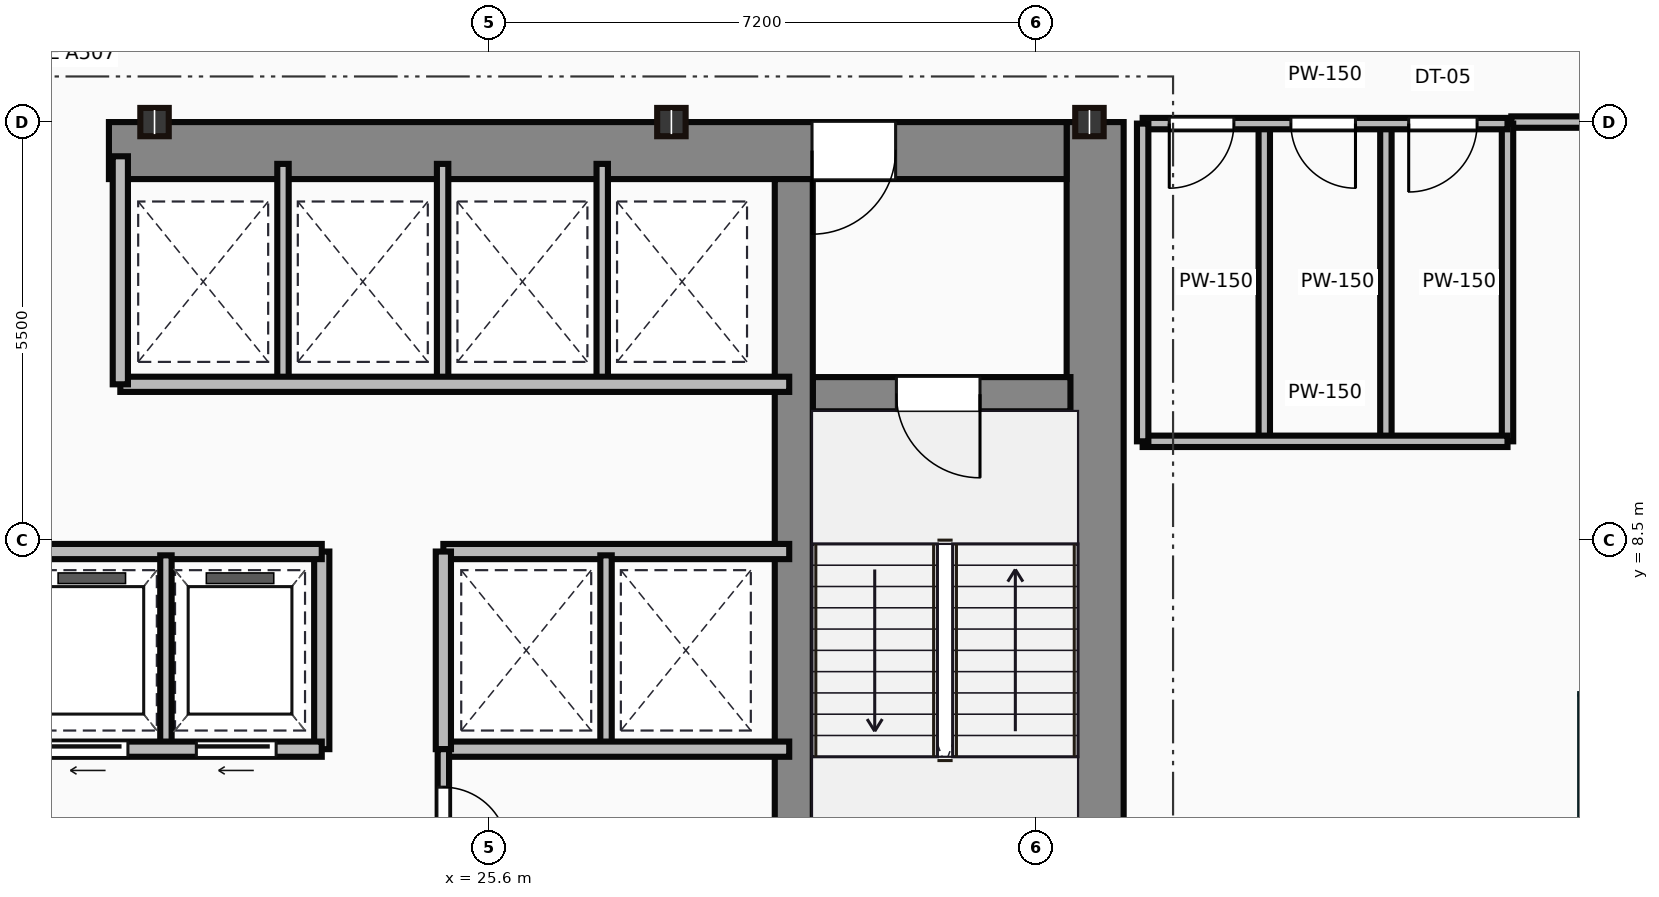
"""IFC4 building model, lengths in metres.
Left out: names, types, materials, properties, quantities, classifications, styles, units other than length and angle.
Written with IfcOpenShell. Run it as: python <this file> out.ifc"""

import sys

from ifc_helpers import new_model, si_unit, direction, frame, frame_2d, origin, origin_2d, place, context, subcontext, project, spatial, rectangle, i_section, extrude, source, transform, mapped, element, fill, save


model = new_model("IFC4")
c1 = context("Model", 3, precision=1e-05, world=origin(), true_north=direction((0.0, 1.0)))
c2 = subcontext(c1, "Body", "Model", "MODEL_VIEW")
j1 = project(units=[si_unit("LENGTHUNIT", "METRE"), si_unit("PLANEANGLEUNIT", "RADIAN")], contexts=[c1])
p1 = place(None, origin())
s1 = spatial("IfcSite", under=j1, at=p1, CompositionType="ELEMENT")
p2 = place(p1, origin())
s2 = spatial("IfcBuilding", under=s1, at=p2, CompositionType="ELEMENT")
p3 = place(p2, frame((0.0, 0.0, 151.55)))
s3 = spatial("IfcBuildingStorey", under=s2, at=p3, CompositionType="ELEMENT", Elevation=151.55)
m1 = source(origin(), c2, "Body", "SweptSolid", [
    extrude(rectangle(XDim=13.1, YDim=0.75, at=frame_2d((6.55, 0.0))), origin(), (0.0, 0.0, 1.0), 3.65),
])
p4 = place(p3, frame((33.575, 0.9, 0.0), z_axis=(0.0, 0.0, 1.0), x_axis=(0.0, 1.0, 0.0)))
e1 = element("IfcWall", 1, at=p4, inside=s3, PredefinedType="SHEAR", context=c2, shape_type="MappedRepresentation", body=[
    mapped(m1, transform((0.0, 0.0, 0.0))),
])
m2 = source(origin(), c2, "Body", "SweptSolid", [
    extrude(rectangle(XDim=12.6, YDim=0.75, at=frame_2d((6.3, 0.0))), origin(), (0.0, 0.0, 1.0), 3.65),
])
p5 = place(p3, frame((20.6, 13.625, 0.0), z_axis=(0.0, 0.0, 1.0), x_axis=(1.0, 0.0, 0.0)))
e2 = element("IfcWall", 2, at=p5, inside=s3, PredefinedType="SHEAR", context=c2, shape_type="MappedRepresentation", body=[
    mapped(m2, transform((0.0, 0.0, 0.0))),
])
p6 = place(p5, frame((9.25, 0.0, 0.0)))
e3 = element("IfcOpeningElement", 3, at=p6, cuts=e2, PredefinedType="OPENING", context=c2, shape_type="SweptSolid", body=[
    extrude(rectangle(XDim=1.1, YDim=2.15, at=frame_2d((0.55, 1.075))), frame((0.0, 0.385, 0.0), z_axis=(0.0, -1.0, 0.0), x_axis=(1.0, 0.0, 0.0)), (0.0, 0.0, 1.0), 0.77),
])
m3 = source(origin(), c2, "Body", "SweptSolid", [
    extrude(rectangle(XDim=12.35, YDim=0.5, at=frame_2d((6.175, 0.0))), origin(), (0.0, 0.0, 1.0), 3.65),
])
p7 = place(p3, frame((29.61, 0.9, 0.0), z_axis=(0.0, 0.0, 1.0), x_axis=(0.0, 1.0, 0.0)))
e4 = element("IfcWall", 4, at=p7, inside=s3, PredefinedType="SHEAR", context=c2, shape_type="MappedRepresentation", body=[
    mapped(m3, transform((0.0, 0.0, 0.0))),
])
m4 = source(origin(), c2, "Body", "SweptSolid", [
    extrude(rectangle(XDim=3.39, YDim=0.45, at=frame_2d((1.695, 0.0))), origin(), (0.0, 0.0, 1.0), 3.65),
])
p8 = place(p3, frame((29.86, 10.42, 0.0), z_axis=(0.0, 0.0, 1.0), x_axis=(1.0, 0.0, 0.0)))
e5 = element("IfcWall", 5, at=p8, inside=s3, PredefinedType="SHEAR", context=c2, shape_type="MappedRepresentation", body=[
    mapped(m4, transform((0.0, 0.0, 0.0))),
])
p9 = place(p8, frame((1.1, 0.0, 0.0)))
e6 = element("IfcOpeningElement", 6, at=p9, cuts=e5, PredefinedType="OPENING", context=c2, shape_type="SweptSolid", body=[
    extrude(rectangle(XDim=1.1, YDim=2.15, at=frame_2d((0.55, 1.075))), frame((0.0, 0.235, 0.0), z_axis=(0.0, -1.0, 0.0), x_axis=(1.0, 0.0, 0.0)), (0.0, 0.0, 1.0), 0.47),
])
m5 = source(origin(), c2, "Body", "SweptSolid", [
    extrude(i_section(OverallWidth=0.374, OverallDepth=0.372, WebThickness=0.016, FlangeThickness=0.026, at=origin_2d()), origin(), (0.0, 0.0, 1.0), 3.65),
])
for number, where, z_axis, x_axis in (
    (7, (21.2, 14.0, 0.0), (0.0, 0.0, 1.0), (1.0, 0.0, 0.0)),
    (8, (28.0, 14.0, 0.0), (0.0, 0.0, 1.0), (1.0, 0.0, 0.0)),
    (9, (33.5, 14.0, 0.0), (0.0, 0.0, 1.0), (1.0, 0.0, 0.0)),
):
    element("IfcColumn", number, at=place(p3, frame(where, z_axis=z_axis, x_axis=x_axis)), inside=s3, PredefinedType="COLUMN", context=c2, shape_type="MappedRepresentation", body=[
        mapped(m5, transform((0.0, 0.0, 0.0))),
    ])
m6 = source(origin(), c2, "Body", "SweptSolid", [
    extrude(rectangle(XDim=11.85, YDim=0.2, at=frame_2d((5.925, 0.0))), origin(), (0.0, 0.0, 1.0), 3.4),
])
p10 = place(p3, frame((11.55, 5.75, 0.0), z_axis=(0.0, 0.0, 1.0), x_axis=(1.0, 0.0, 0.0)))
e10 = element("IfcWall", 10, at=p10, inside=s3, PredefinedType="PARTITIONING", context=c2, shape_type="MappedRepresentation", body=[
    mapped(m6, transform((0.0, 0.0, 0.0))),
])
p11 = place(p10, frame((0.45, 0.0, 0.0)))
e11 = element("IfcOpeningElement", 11, at=p11, cuts=e10, PredefinedType="OPENING", context=c2, shape_type="SweptSolid", body=[
    extrude(rectangle(XDim=1.05, YDim=2.15, at=frame_2d((0.525, 1.075))), frame((0.0, 0.11, 0.0), z_axis=(0.0, -1.0, 0.0), x_axis=(1.0, 0.0, 0.0)), (0.0, 0.0, 1.0), 0.22),
])
p12 = place(p10, frame((2.4, 0.0, 0.0)))
e12 = element("IfcOpeningElement", 12, at=p12, cuts=e10, PredefinedType="OPENING", context=c2, shape_type="SweptSolid", body=[
    extrude(rectangle(XDim=1.05, YDim=2.15, at=frame_2d((0.525, 1.075))), frame((0.0, 0.11, 0.0), z_axis=(0.0, -1.0, 0.0), x_axis=(1.0, 0.0, 0.0)), (0.0, 0.0, 1.0), 0.22),
])
p13 = place(p10, frame((4.35, 0.0, 0.0)))
e13 = element("IfcOpeningElement", 13, at=p13, cuts=e10, PredefinedType="OPENING", context=c2, shape_type="SweptSolid", body=[
    extrude(rectangle(XDim=1.05, YDim=2.15, at=frame_2d((0.525, 1.075))), frame((0.0, 0.11, 0.0), z_axis=(0.0, -1.0, 0.0), x_axis=(1.0, 0.0, 0.0)), (0.0, 0.0, 1.0), 0.22),
])
p14 = place(p10, frame((6.3, 0.0, 0.0)))
e14 = element("IfcOpeningElement", 14, at=p14, cuts=e10, PredefinedType="OPENING", context=c2, shape_type="SweptSolid", body=[
    extrude(rectangle(XDim=1.05, YDim=2.15, at=frame_2d((0.525, 1.075))), frame((0.0, 0.11, 0.0), z_axis=(0.0, -1.0, 0.0), x_axis=(1.0, 0.0, 0.0)), (0.0, 0.0, 1.0), 0.22),
])
p15 = place(p10, frame((8.25, 0.0, 0.0)))
e15 = element("IfcOpeningElement", 15, at=p15, cuts=e10, PredefinedType="OPENING", context=c2, shape_type="SweptSolid", body=[
    extrude(rectangle(XDim=1.05, YDim=2.15, at=frame_2d((0.525, 1.075))), frame((0.0, 0.11, 0.0), z_axis=(0.0, -1.0, 0.0), x_axis=(1.0, 0.0, 0.0)), (0.0, 0.0, 1.0), 0.22),
])
p16 = place(p10, frame((10.2, 0.0, 0.0)))
e16 = element("IfcOpeningElement", 16, at=p16, cuts=e10, PredefinedType="OPENING", context=c2, shape_type="SweptSolid", body=[
    extrude(rectangle(XDim=1.05, YDim=2.15, at=frame_2d((0.525, 1.075))), frame((0.0, 0.11, 0.0), z_axis=(0.0, -1.0, 0.0), x_axis=(1.0, 0.0, 0.0)), (0.0, 0.0, 1.0), 0.22),
])
p17 = place(p3, frame((11.55, 8.35, 0.0), z_axis=(0.0, 0.0, 1.0), x_axis=(1.0, 0.0, 0.0)))
e17 = element("IfcWall", 17, at=p17, inside=s3, PredefinedType="PARTITIONING", context=c2, shape_type="MappedRepresentation", body=[
    mapped(m6, transform((0.0, 0.0, 0.0))),
])
m7 = source(origin(), c2, "Body", "SweptSolid", [
    extrude(rectangle(XDim=2.6, YDim=0.2, at=frame_2d((1.3, 0.0))), origin(), (0.0, 0.0, 1.0), 3.4),
])
p18 = place(p3, frame((23.4, 5.75, 0.0), z_axis=(0.0, 0.0, 1.0), x_axis=(0.0, 1.0, 0.0)))
e18 = element("IfcWall", 18, at=p18, inside=s3, PredefinedType="PARTITIONING", context=c2, shape_type="MappedRepresentation", body=[
    mapped(m7, transform((0.0, 0.0, 0.0))),
])
m8 = source(origin(), c2, "Body", "SweptSolid", [
    extrude(rectangle(XDim=2.5, YDim=0.15, at=frame_2d((1.25, 0.0))), origin(), (0.0, 0.0, 1.0), 3.4),
])
p19 = place(p3, frame((21.35, 5.8, 0.0), z_axis=(0.0, 0.0, 1.0), x_axis=(0.0, 1.0, 0.0)))
e19 = element("IfcWall", 19, at=p19, inside=s3, PredefinedType="PARTITIONING", context=c2, shape_type="MappedRepresentation", body=[
    mapped(m8, transform((0.0, 0.0, 0.0))),
])
m9 = source(origin(), c2, "Body", "SweptSolid", [
    extrude(rectangle(XDim=8.8, YDim=0.2, at=frame_2d((4.4, 0.0))), origin(), (0.0, 0.0, 1.0), 3.4),
])
p20 = place(p3, frame((20.75, 10.55, 0.0), z_axis=(0.0, 0.0, 1.0), x_axis=(1.0, 0.0, 0.0)))
e20 = element("IfcWall", 20, at=p20, inside=s3, PredefinedType="PARTITIONING", context=c2, shape_type="MappedRepresentation", body=[
    mapped(m9, transform((0.0, 0.0, 0.0))),
])
m10 = source(origin(), c2, "Body", "SweptSolid", [
    extrude(rectangle(XDim=3.0, YDim=0.2, at=frame_2d((1.5, 0.0))), origin(), (0.0, 0.0, 1.0), 3.4),
])
p21 = place(p3, frame((20.75, 10.55, 0.0), z_axis=(0.0, 0.0, 1.0), x_axis=(0.0, 1.0, 0.0)))
e21 = element("IfcWall", 21, at=p21, inside=s3, PredefinedType="PARTITIONING", context=c2, shape_type="MappedRepresentation", body=[
    mapped(m10, transform((0.0, 0.0, 0.0))),
])
m11 = source(origin(), c2, "Body", "SweptSolid", [
    extrude(rectangle(XDim=2.85, YDim=0.15, at=frame_2d((1.425, 0.0))), origin(), (0.0, 0.0, 1.0), 3.4),
])
for number, where, z_axis, x_axis in (
    (22, (22.89, 10.6, 0.0), (0.0, 0.0, 1.0), (0.0, 1.0, 0.0)),
    (23, (24.99, 10.6, 0.0), (0.0, 0.0, 1.0), (0.0, 1.0, 0.0)),
    (24, (27.09, 10.6, 0.0), (0.0, 0.0, 1.0), (0.0, 1.0, 0.0)),
):
    element("IfcWall", number, at=place(p3, frame(where, z_axis=z_axis, x_axis=x_axis)), inside=s3, PredefinedType="PARTITIONING", context=c2, shape_type="MappedRepresentation", body=[
        mapped(m11, transform((0.0, 0.0, 0.0))),
    ])
m12 = source(origin(), c2, "Body", "SweptSolid", [
    extrude(rectangle(XDim=4.55, YDim=0.2, at=frame_2d((2.275, 0.0))), origin(), (0.0, 0.0, 1.0), 3.4),
])
for number, where, z_axis, x_axis in (
    (25, (25.0, 8.35, 0.0), (0.0, 0.0, 1.0), (1.0, 0.0, 0.0)),
    (26, (25.0, 5.75, 0.0), (0.0, 0.0, 1.0), (1.0, 0.0, 0.0)),
):
    element("IfcWall", number, at=place(p3, frame(where, z_axis=z_axis, x_axis=x_axis)), inside=s3, PredefinedType="PARTITIONING", context=c2, shape_type="MappedRepresentation", body=[
        mapped(m12, transform((0.0, 0.0, 0.0))),
    ])
p22 = place(p3, frame((25.0, 5.75, 0.0), z_axis=(0.0, 0.0, 1.0), x_axis=(0.0, 1.0, 0.0)))
e27 = element("IfcWall", 27, at=p22, inside=s3, PredefinedType="PARTITIONING", context=c2, shape_type="MappedRepresentation", body=[
    mapped(m7, transform((0.0, 0.0, 0.0))),
])
p23 = place(p3, frame((27.14, 5.8, 0.0), z_axis=(0.0, 0.0, 1.0), x_axis=(0.0, 1.0, 0.0)))
e28 = element("IfcWall", 28, at=p23, inside=s3, PredefinedType="PARTITIONING", context=c2, shape_type="MappedRepresentation", body=[
    mapped(m8, transform((0.0, 0.0, 0.0))),
])
m13 = source(origin(), c2, "Body", "SweptSolid", [
    extrude(rectangle(XDim=4.9, YDim=0.15, at=frame_2d((2.45, 0.0))), origin(), (0.0, 0.0, 1.0), 3.4),
])
p24 = place(p3, frame((25.0, 0.85, 0.0), z_axis=(0.0, 0.0, 1.0), x_axis=(0.0, 1.0, 0.0)))
e29 = element("IfcWall", 29, at=p24, inside=s3, PredefinedType="PARTITIONING", context=c2, shape_type="MappedRepresentation", body=[
    mapped(m13, transform((0.0, 0.0, 0.0))),
])
p25 = place(p24, frame((1.85, 0.0, 0.0)))
e30 = element("IfcOpeningElement", 30, at=p25, cuts=e29, PredefinedType="OPENING", context=c2, shape_type="SweptSolid", body=[
    extrude(rectangle(XDim=0.95, YDim=2.15, at=frame_2d((0.475, 1.075))), frame((0.0, 0.085, 0.0), z_axis=(0.0, -1.0, 0.0), x_axis=(1.0, 0.0, 0.0)), (0.0, 0.0, 1.0), 0.17),
])
p26 = place(p24, frame((3.55, 0.0, 0.0)))
e31 = element("IfcOpeningElement", 31, at=p26, cuts=e29, PredefinedType="OPENING", context=c2, shape_type="SweptSolid", body=[
    extrude(rectangle(XDim=0.85, YDim=2.15, at=frame_2d((0.425, 1.075))), frame((0.0, 0.085, 0.0), z_axis=(0.0, -1.0, 0.0), x_axis=(1.0, 0.0, 0.0)), (0.0, 0.0, 1.0), 0.17),
])
m14 = source(origin(), c2, "Body", "SweptSolid", [
    extrude(rectangle(XDim=4.8, YDim=0.15, at=frame_2d((2.4, 0.0))), origin(), (0.0, 0.0, 1.0), 2.76),
])
p27 = place(p3, frame((34.2, 13.98, 0.0), z_axis=(0.0, 0.0, 1.0), x_axis=(1.0, 0.0, 0.0)))
e32 = element("IfcWall", 32, at=p27, inside=s3, PredefinedType="PARTITIONING", context=c2, shape_type="MappedRepresentation", body=[
    mapped(m14, transform((0.0, 0.0, 0.0))),
])
p28 = place(p27, frame((0.35, 0.0, 0.0)))
e33 = element("IfcOpeningElement", 33, at=p28, cuts=e32, PredefinedType="OPENING", context=c2, shape_type="SweptSolid", body=[
    extrude(rectangle(XDim=0.85, YDim=2.1, at=frame_2d((0.425, 1.05))), frame((0.0, 0.085, 0.0), z_axis=(0.0, -1.0, 0.0), x_axis=(1.0, 0.0, 0.0)), (0.0, 0.0, 1.0), 0.17),
])
p29 = place(p27, frame((1.95, 0.0, 0.0)))
e34 = element("IfcOpeningElement", 34, at=p29, cuts=e32, PredefinedType="OPENING", context=c2, shape_type="SweptSolid", body=[
    extrude(rectangle(XDim=0.85, YDim=2.1, at=frame_2d((0.425, 1.05))), frame((0.0, 0.085, 0.0), z_axis=(0.0, -1.0, 0.0), x_axis=(1.0, 0.0, 0.0)), (0.0, 0.0, 1.0), 0.17),
])
p30 = place(p27, frame((3.5, 0.0, 0.0)))
e35 = element("IfcOpeningElement", 35, at=p30, cuts=e32, PredefinedType="OPENING", context=c2, shape_type="SweptSolid", body=[
    extrude(rectangle(XDim=0.9, YDim=2.1, at=frame_2d((0.45, 1.05))), frame((0.0, 0.085, 0.0), z_axis=(0.0, -1.0, 0.0), x_axis=(1.0, 0.0, 0.0)), (0.0, 0.0, 1.0), 0.17),
])
m15 = source(origin(), c2, "Body", "SweptSolid", [
    extrude(rectangle(XDim=4.8, YDim=0.15, at=frame_2d((2.4, 0.0))), origin(), (0.0, 0.0, 1.0), 3.4),
])
p31 = place(p3, frame((34.2, 9.8, 0.0), z_axis=(0.0, 0.0, 1.0), x_axis=(1.0, 0.0, 0.0)))
e36 = element("IfcWall", 36, at=p31, inside=s3, PredefinedType="PARTITIONING", context=c2, shape_type="MappedRepresentation", body=[
    mapped(m15, transform((0.0, 0.0, 0.0))),
])
m16 = source(origin(), c2, "Body", "SweptSolid", [
    extrude(rectangle(XDim=4.18, YDim=0.15, at=frame_2d((2.09, 0.0))), origin(), (0.0, 0.0, 1.0), 3.4),
])
for number, where, z_axis, x_axis in (
    (37, (39.0, 9.8, 0.0), (0.0, 0.0, 1.0), (0.0, 1.0, 0.0)),
    (38, (34.2, 9.8, 0.0), (0.0, 0.0, 1.0), (0.0, 1.0, 0.0)),
    (39, (35.8, 9.8, 0.0), (0.0, 0.0, 1.0), (0.0, 1.0, 0.0)),
    (40, (37.4, 9.8, 0.0), (0.0, 0.0, 1.0), (0.0, 1.0, 0.0)),
):
    element("IfcWall", number, at=place(p3, frame(where, z_axis=z_axis, x_axis=x_axis)), inside=s3, PredefinedType="PARTITIONING", context=c2, shape_type="MappedRepresentation", body=[
        mapped(m16, transform((0.0, 0.0, 0.0))),
    ])
m17 = source(origin(), c2, "Body", "SweptSolid", [
    extrude(rectangle(XDim=1.75, YDim=0.15, at=frame_2d((0.875, 0.0))), origin(), (0.0, 0.0, 1.0), 2.76),
])
p32 = place(p3, frame((40.8, 14.0, 0.0), z_axis=(0.0, 0.0, 1.0), x_axis=(-1.0, 0.0, 0.0)))
e41 = element("IfcWall", 41, at=p32, inside=s3, PredefinedType="PARTITIONING", context=c2, shape_type="MappedRepresentation", body=[
    mapped(m17, transform((0.0, 0.0, 0.0))),
])
m18 = source(origin(), c2, "Body", "SweptSolid", [
    extrude(rectangle(XDim=1.1, YDim=2.15, at=frame_2d((0.55, 1.075))), frame((0.0, 0.025, 0.0), z_axis=(0.0, -1.0, 0.0), x_axis=(1.0, 0.0, 0.0)), (0.0, 0.0, 1.0), 0.05),
])
p33 = place(p9, frame((1.1, 0.0, 0.0), z_axis=(0.0, 0.0, 1.0), x_axis=(-1.0, 0.0, 0.0)))
e42 = element("IfcDoor", 42, at=p33, inside=s3, OperationType="SINGLE_SWING_RIGHT", PredefinedType="DOOR", context=c2, shape_type="MappedRepresentation", body=[
    mapped(m18, transform((0.0, 0.0, 0.0))),
])
fill(e6, e42)
p34 = place(p6, origin())
e43 = element("IfcDoor", 43, at=p34, inside=s3, OperationType="SINGLE_SWING_LEFT", PredefinedType="DOOR", context=c2, shape_type="MappedRepresentation", body=[
    mapped(m18, transform((0.0, 0.0, 0.0))),
])
fill(e3, e43)
m19 = source(origin(), c2, "Body", "SweptSolid", [
    extrude(rectangle(XDim=1.05, YDim=2.15, at=frame_2d((0.525, 1.075))), frame((0.0, 0.025, 0.0), z_axis=(0.0, -1.0, 0.0), x_axis=(1.0, 0.0, 0.0)), (0.0, 0.0, 1.0), 0.05),
])
p35 = place(p15, frame((1.05, 0.0, 0.0), z_axis=(0.0, 0.0, 1.0), x_axis=(-1.0, 0.0, 0.0)))
e44 = element("IfcDoor", 44, at=p35, inside=s3, OperationType="SLIDING_TO_LEFT", PredefinedType="DOOR", context=c2, shape_type="MappedRepresentation", body=[
    mapped(m19, transform((0.0, 0.0, 0.0))),
])
fill(e15, e44)
p36 = place(p16, frame((1.05, 0.0, 0.0), z_axis=(0.0, 0.0, 1.0), x_axis=(-1.0, 0.0, 0.0)))
e45 = element("IfcDoor", 45, at=p36, inside=s3, OperationType="SLIDING_TO_LEFT", PredefinedType="DOOR", context=c2, shape_type="MappedRepresentation", body=[
    mapped(m19, transform((0.0, 0.0, 0.0))),
])
fill(e16, e45)
m20 = source(origin(), c2, "Body", "SweptSolid", [
    extrude(rectangle(XDim=0.85, YDim=2.15, at=frame_2d((0.425, 1.075))), frame((0.0, 0.025, 0.0), z_axis=(0.0, -1.0, 0.0), x_axis=(1.0, 0.0, 0.0)), (0.0, 0.0, 1.0), 0.05),
])
p37 = place(p26, origin())
e46 = element("IfcDoor", 46, at=p37, inside=s3, OperationType="SINGLE_SWING_LEFT", PredefinedType="DOOR", context=c2, shape_type="MappedRepresentation", body=[
    mapped(m20, transform((0.0, 0.0, 0.0))),
])
fill(e31, e46)
m21 = source(origin(), c2, "Body", "SweptSolid", [
    extrude(rectangle(XDim=0.85, YDim=2.1, at=frame_2d((0.425, 1.05))), frame((0.0, 0.025, 0.0), z_axis=(0.0, -1.0, 0.0), x_axis=(1.0, 0.0, 0.0)), (0.0, 0.0, 1.0), 0.05),
])
p38 = place(p28, frame((0.85, 0.0, 0.0), z_axis=(0.0, 0.0, 1.0), x_axis=(-1.0, 0.0, 0.0)))
e47 = element("IfcDoor", 47, at=p38, inside=s3, OperationType="SINGLE_SWING_LEFT", PredefinedType="DOOR", context=c2, shape_type="MappedRepresentation", body=[
    mapped(m21, transform((0.0, 0.0, 0.0))),
])
fill(e33, e47)
p39 = place(p29, frame((0.85, 0.0, 0.0), z_axis=(0.0, 0.0, 1.0), x_axis=(-1.0, 0.0, 0.0)))
e48 = element("IfcDoor", 48, at=p39, inside=s3, OperationType="SINGLE_SWING_RIGHT", PredefinedType="DOOR", context=c2, shape_type="MappedRepresentation", body=[
    mapped(m21, transform((0.0, 0.0, 0.0))),
])
fill(e34, e48)
m22 = source(origin(), c2, "Body", "SweptSolid", [
    extrude(rectangle(XDim=0.9, YDim=2.1, at=frame_2d((0.45, 1.05))), frame((0.0, 0.025, 0.0), z_axis=(0.0, -1.0, 0.0), x_axis=(1.0, 0.0, 0.0)), (0.0, 0.0, 1.0), 0.05),
])
p40 = place(p30, frame((0.9, 0.0, 0.0), z_axis=(0.0, 0.0, 1.0), x_axis=(-1.0, 0.0, 0.0)))
e49 = element("IfcDoor", 49, at=p40, inside=s3, OperationType="SINGLE_SWING_LEFT", PredefinedType="DOOR", context=c2, shape_type="MappedRepresentation", body=[
    mapped(m22, transform((0.0, 0.0, 0.0))),
])
fill(e35, e49)
save(model, sys.argv[1])
